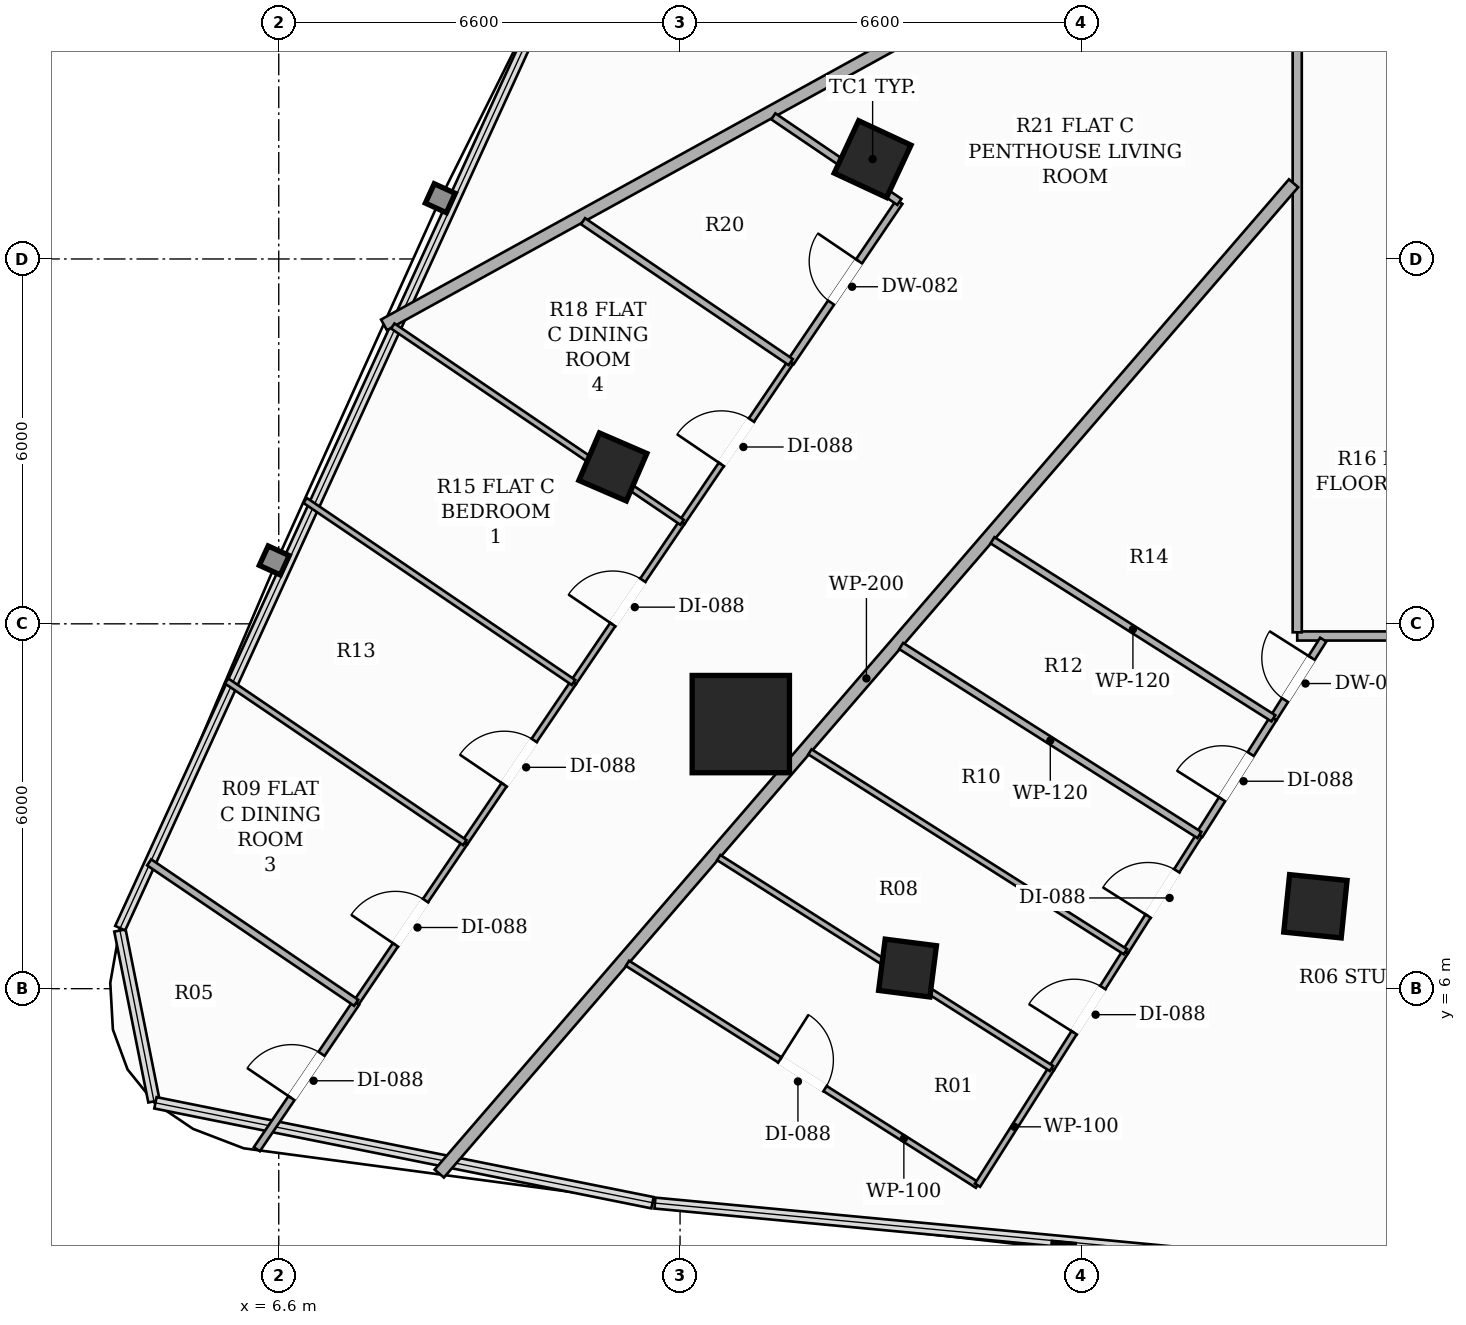
"""IFC4 building model, lengths in metres.
Left out: names, types, materials, properties, quantities, classifications, styles, units other than length and angle.
Written with IfcOpenShell. Run it as: python <this file> out.ifc"""

import sys

from ifc_helpers import new_model, si_unit, direction, frame, frame_2d, origin, origin_2d, place, context, subcontext, project, spatial, rectangle, hollow_rectangle, extrude, element, fill, save


model = new_model("IFC4")
c1 = context("Model", 3, precision=1e-05, world=origin(), true_north=direction((0.0, 1.0)))
c2 = subcontext(c1, "Body", "Model", "MODEL_VIEW")
j1 = project(units=[si_unit("LENGTHUNIT", "METRE"), si_unit("PLANEANGLEUNIT", "RADIAN")], contexts=[c1])
p1 = place(None, origin())
s1 = spatial("IfcSite", under=j1, at=p1, CompositionType="ELEMENT")
p2 = place(p1, origin())
s2 = spatial("IfcBuilding", under=s1, at=p2, CompositionType="ELEMENT")
p3 = place(p2, frame((0.0, 0.0, 30.2)))
s3 = spatial("IfcBuildingStorey", under=s2, at=p3, CompositionType="ELEMENT", Elevation=30.2)
p4 = place(p3, frame((14.199, 10.351, 0.0), z_axis=(0.0, 0.0, 1.0), x_axis=(1.0, 0.0, 0.0)))
e1 = element("IfcColumn", 1, at=p4, inside=s3, PredefinedType="COLUMN", context=c2, shape_type="SweptSolid", body=[
    extrude(hollow_rectangle(XDim=1.6, YDim=1.6, WallThickness=0.05, at=origin_2d()), origin(), (0.0, 0.0, 1.0), 3.3),
])
for number, where, z_axis, x_axis in (
    (2, (16.367, 19.642, 0.0), (0.0, 0.0, 1.0), (0.423, 0.906, 0.0)),
    (3, (23.649, 7.355, 0.0), (0.0, 0.0, 1.0), (-0.995, 0.101, 0.0)),
):
    element("IfcColumn", number, at=place(p3, frame(where, z_axis=z_axis, x_axis=x_axis)), inside=s3, PredefinedType="COLUMN", context=c2, shape_type="SweptSolid", body=[
        extrude(hollow_rectangle(XDim=0.95, YDim=0.95, WallThickness=0.032, at=origin_2d()), origin(), (0.0, 0.0, 1.0), 3.3),
    ])
for number, where, z_axis, x_axis in (
    (4, (12.095, 14.58, 0.0), (0.0, 0.0, 1.0), (0.397, 0.918, 0.0)),
    (5, (16.941, 6.339, 0.0), (0.0, 0.0, 1.0), (-0.992, 0.127, 0.0)),
):
    element("IfcColumn", number, at=place(p3, frame(where, z_axis=z_axis, x_axis=x_axis)), inside=s3, PredefinedType="COLUMN", context=c2, shape_type="SweptSolid", body=[
        extrude(hollow_rectangle(XDim=0.85, YDim=0.85, WallThickness=0.028, at=origin_2d()), origin(), (0.0, 0.0, 1.0), 3.3),
    ])
p5 = place(p3, frame((42.59, 11.8, 0.0), z_axis=(0.0, 0.0, 1.0), x_axis=(-1.0, 0.0, 0.0)))
e6 = element("IfcWall", 6, at=p5, inside=s3, PredefinedType="PARTITIONING", context=c2, shape_type="SweptSolid", body=[
    extrude(rectangle(XDim=19.24, YDim=0.15, at=frame_2d((9.62, 0.0))), origin(), (0.0, 0.0, 1.0), 2.669),
])
p6 = place(p5, frame((12.818, 0.0, 0.0)))
e7 = element("IfcOpeningElement", 7, at=p6, cuts=e6, PredefinedType="OPENING", context=c2, shape_type="SweptSolid", body=[
    extrude(rectangle(XDim=0.92, YDim=2.15, at=frame_2d((0.46, 1.075))), frame((0.0, 0.085, 0.0), z_axis=(0.0, -1.0, 0.0), x_axis=(1.0, 0.0, 0.0)), (0.0, 0.0, 1.0), 0.17),
])
p7 = place(p5, frame((3.519, 0.0, 0.0)))
e8 = element("IfcOpeningElement", 8, at=p7, cuts=e6, PredefinedType="OPENING", context=c2, shape_type="SweptSolid", body=[
    extrude(rectangle(XDim=0.88, YDim=2.1, at=frame_2d((0.44, 1.05))), frame((0.0, 0.085, 0.0), z_axis=(0.0, -1.0, 0.0), x_axis=(1.0, 0.0, 0.0)), (0.0, 0.0, 1.0), 0.17),
])
p8 = place(p3, frame((23.35, 11.86, 0.0), z_axis=(0.0, 0.0, 1.0), x_axis=(0.0, 1.0, 0.0)))
e9 = element("IfcWall", 9, at=p8, inside=s3, PredefinedType="PARTITIONING", context=c2, shape_type="SweptSolid", body=[
    extrude(rectangle(XDim=25.04, YDim=0.15, at=frame_2d((12.52, 0.0))), origin(), (0.0, 0.0, 1.0), 2.413),
])
p9 = place(p8, frame((9.872, 0.0, 0.0)))
e10 = element("IfcOpeningElement", 10, at=p9, cuts=e9, PredefinedType="OPENING", context=c2, shape_type="SweptSolid", body=[
    extrude(rectangle(XDim=0.92, YDim=2.15, at=frame_2d((0.46, 1.075))), frame((0.0, 0.085, 0.0), z_axis=(0.0, -1.0, 0.0), x_axis=(1.0, 0.0, 0.0)), (0.0, 0.0, 1.0), 0.17),
])
p10 = place(p8, frame((18.578, 0.0, 0.0)))
e11 = element("IfcOpeningElement", 11, at=p10, cuts=e9, PredefinedType="OPENING", context=c2, shape_type="SweptSolid", body=[
    extrude(rectangle(XDim=0.88, YDim=2.1, at=frame_2d((0.44, 1.05))), frame((0.0, 0.085, 0.0), z_axis=(0.0, -1.0, 0.0), x_axis=(1.0, 0.0, 0.0)), (0.0, 0.0, 1.0), 0.17),
])
p11 = place(p3, frame((9.24, 2.959, 0.0), z_axis=(0.0, 0.0, 1.0), x_axis=(0.653213734957, 0.757173570896, 0.0)))
e12 = element("IfcWall", 12, at=p11, inside=s3, PredefinedType="PARTITIONING", context=c2, shape_type="SweptSolid", body=[
    extrude(rectangle(XDim=21.509, YDim=0.2, at=frame_2d((10.754, 0.0))), origin(), (0.0, 0.0, 1.0), 2.413),
])
p12 = place(p3, frame((8.331, 16.916, 0.0), z_axis=(0.0, 0.0, 1.0), x_axis=(0.875977946948, 0.482351154721, 0.0)))
e13 = element("IfcWall", 13, at=p12, inside=s3, PredefinedType="PARTITIONING", context=c2, shape_type="SweptSolid", body=[
    extrude(rectangle(XDim=17.077, YDim=0.2, at=frame_2d((8.539, 0.0))), origin(), (0.0, 0.0, 1.0), 2.413),
])
p13 = place(p3, frame((22.958, 10.446, 0.0), z_axis=(0.0, 0.0, 1.0), x_axis=(0.535317457649, 0.844650945383, 0.0)))
e14 = element("IfcWall", 14, at=p13, inside=s3, PredefinedType="PARTITIONING", context=c2, shape_type="SweptSolid", body=[
    extrude(rectangle(XDim=1.532, YDim=0.12, at=frame_2d((0.766, 0.0))), origin(), (0.0, 0.0, 1.0), 3.06),
])
p14 = place(p13, frame((0.356, 0.0, 0.0)))
e15 = element("IfcOpeningElement", 15, at=p14, cuts=e14, PredefinedType="OPENING", context=c2, shape_type="SweptSolid", body=[
    extrude(rectangle(XDim=0.82, YDim=2.1, at=frame_2d((0.41, 1.05))), frame((0.0, 0.07, 0.0), z_axis=(0.0, -1.0, 0.0), x_axis=(1.0, 0.0, 0.0)), (0.0, 0.0, 1.0), 0.14),
])
p15 = place(p3, frame((21.741, 8.527, 0.0), z_axis=(0.0, 0.0, 1.0), x_axis=(0.535588747522, 0.844478947948, 0.0)))
e16 = element("IfcWall", 16, at=p15, inside=s3, PredefinedType="PARTITIONING", context=c2, shape_type="SweptSolid", body=[
    extrude(rectangle(XDim=2.272, YDim=0.12, at=frame_2d((1.136, 0.0))), origin(), (0.0, 0.0, 1.0), 3.06),
])
p16 = place(p15, frame((0.696, 0.0, 0.0)))
e17 = element("IfcOpeningElement", 17, at=p16, cuts=e16, PredefinedType="OPENING", context=c2, shape_type="SweptSolid", body=[
    extrude(rectangle(XDim=0.88, YDim=2.1, at=frame_2d((0.44, 1.05))), frame((0.0, 0.07, 0.0), z_axis=(0.0, -1.0, 0.0), x_axis=(1.0, 0.0, 0.0)), (0.0, 0.0, 1.0), 0.14),
])
p17 = place(p3, frame((12.335, 6.417, 0.0), z_axis=(0.0, 0.0, 1.0), x_axis=(0.844634990869, -0.535342630657, 0.0)))
e18 = element("IfcWall", 18, at=p17, inside=s3, PredefinedType="PARTITIONING", context=c2, shape_type="SweptSolid", body=[
    extrude(rectangle(XDim=6.816, YDim=0.1, at=frame_2d((3.408, 0.0))), origin(), (0.0, 0.0, 1.0), 2.619),
])
p18 = place(p17, frame((2.968, 0.0, 0.0)))
e19 = element("IfcOpeningElement", 19, at=p18, cuts=e18, PredefinedType="OPENING", context=c2, shape_type="SweptSolid", body=[
    extrude(rectangle(XDim=0.88, YDim=2.1, at=frame_2d((0.44, 1.05))), frame((0.0, 0.06, 0.0), z_axis=(0.0, -1.0, 0.0), x_axis=(1.0, 0.0, 0.0)), (0.0, 0.0, 1.0), 0.12),
])
p19 = place(p3, frame((18.092, 2.768, 0.0), z_axis=(0.0, 0.0, 1.0), x_axis=(0.535087860904, 0.844796414003, 0.0)))
e20 = element("IfcWall", 20, at=p19, inside=s3, PredefinedType="PARTITIONING", context=c2, shape_type="SweptSolid", body=[
    extrude(rectangle(XDim=2.273, YDim=0.1, at=frame_2d((1.136, 0.0))), origin(), (0.0, 0.0, 1.0), 3.06),
])
p20 = place(p3, frame((19.308, 4.688, 0.0), z_axis=(0.0, 0.0, 1.0), x_axis=(0.535512120593, 0.844527541705, 0.0)))
e21 = element("IfcWall", 21, at=p20, inside=s3, PredefinedType="PARTITIONING", context=c2, shape_type="SweptSolid", body=[
    extrude(rectangle(XDim=2.272, YDim=0.1, at=frame_2d((1.136, 0.0))), origin(), (0.0, 0.0, 1.0), 2.413),
])
p21 = place(p20, frame((0.696, 0.0, 0.0)))
e22 = element("IfcOpeningElement", 22, at=p21, cuts=e21, PredefinedType="OPENING", context=c2, shape_type="SweptSolid", body=[
    extrude(rectangle(XDim=0.88, YDim=2.1, at=frame_2d((0.44, 1.05))), frame((0.0, 0.06, 0.0), z_axis=(0.0, -1.0, 0.0), x_axis=(1.0, 0.0, 0.0)), (0.0, 0.0, 1.0), 0.12),
])
p22 = place(p3, frame((20.525, 6.607, 0.0), z_axis=(0.0, 0.0, 1.0), x_axis=(0.53503930364, 0.844827167864, 0.0)))
e23 = element("IfcWall", 23, at=p22, inside=s3, PredefinedType="PARTITIONING", context=c2, shape_type="SweptSolid", body=[
    extrude(rectangle(XDim=2.273, YDim=0.1, at=frame_2d((1.136, 0.0))), origin(), (0.0, 0.0, 1.0), 2.413),
])
p23 = place(p22, frame((0.696, 0.0, 0.0)))
e24 = element("IfcOpeningElement", 24, at=p23, cuts=e23, PredefinedType="OPENING", context=c2, shape_type="SweptSolid", body=[
    extrude(rectangle(XDim=0.88, YDim=2.1, at=frame_2d((0.44, 1.05))), frame((0.0, 0.06, 0.0), z_axis=(0.0, -1.0, 0.0), x_axis=(1.0, 0.0, 0.0)), (0.0, 0.0, 1.0), 0.12),
])
p24 = place(p3, frame((22.958, 10.446, 0.0), z_axis=(0.0, 0.0, 1.0), x_axis=(-0.844661668189, 0.535300538289, 0.0)))
e25 = element("IfcWall", 25, at=p24, inside=s3, PredefinedType="PARTITIONING", context=c2, shape_type="SweptSolid", body=[
    extrude(rectangle(XDim=5.47, YDim=0.12, at=frame_2d((2.735, 0.0))), origin(), (0.0, 0.0, 1.0), 2.669),
])
p25 = place(p3, frame((21.741, 8.527, 0.0), z_axis=(0.0, 0.0, 1.0), x_axis=(-0.84466254328, 0.535299157463, 0.0)))
e26 = element("IfcWall", 26, at=p25, inside=s3, PredefinedType="PARTITIONING", context=c2, shape_type="SweptSolid", body=[
    extrude(rectangle(XDim=5.806, YDim=0.12, at=frame_2d((2.903, 0.0))), origin(), (0.0, 0.0, 1.0), 2.669),
])
p26 = place(p3, frame((13.836, 8.156, 0.0), z_axis=(0.0, 0.0, 1.0), x_axis=(0.844657780298, -0.535306673023, 0.0)))
e27 = element("IfcWall", 27, at=p26, inside=s3, PredefinedType="PARTITIONING", context=c2, shape_type="SweptSolid", body=[
    extrude(rectangle(XDim=6.479, YDim=0.1, at=frame_2d((3.239, 0.0))), origin(), (0.0, 0.0, 1.0), 2.413),
])
p27 = place(p3, frame((15.336, 9.895, 0.0), z_axis=(0.0, 0.0, 1.0), x_axis=(0.844690904033, -0.535254403666, 0.0)))
e28 = element("IfcWall", 28, at=p27, inside=s3, PredefinedType="PARTITIONING", context=c2, shape_type="SweptSolid", body=[
    extrude(rectangle(XDim=6.143, YDim=0.1, at=frame_2d((3.072, 0.0))), origin(), (0.0, 0.0, 1.0), 2.413),
])
p28 = place(p3, frame((15.02, 16.304, 0.0), z_axis=(0.0, 0.0, 1.0), x_axis=(0.561248235284, 0.827647520621, 0.0)))
e29 = element("IfcWall", 29, at=p28, inside=s3, PredefinedType="PARTITIONING", context=c2, shape_type="SweptSolid", body=[
    extrude(rectangle(XDim=3.184, YDim=0.12, at=frame_2d((1.592, 0.0))), origin(), (0.0, 0.0, 1.0), 2.669),
])
p29 = place(p28, frame((1.182, 0.0, 0.0)))
e30 = element("IfcOpeningElement", 30, at=p29, cuts=e29, PredefinedType="OPENING", context=c2, shape_type="SweptSolid", body=[
    extrude(rectangle(XDim=0.82, YDim=2.1, at=frame_2d((0.41, 1.05))), frame((0.0, 0.07, 0.0), z_axis=(0.0, -1.0, 0.0), x_axis=(1.0, 0.0, 0.0)), (0.0, 0.0, 1.0), 0.14),
])
p30 = place(p3, frame((16.807, 18.939, 0.0), z_axis=(0.0, 0.0, 1.0), x_axis=(-0.82760029168, 0.561317875372, 0.0)))
e31 = element("IfcWall", 31, at=p30, inside=s3, PredefinedType="PARTITIONING", context=c2, shape_type="SweptSolid", body=[
    extrude(rectangle(XDim=2.505, YDim=0.12, at=frame_2d((1.252, 0.0))), origin(), (0.0, 0.0, 1.0), 2.413),
])
p31 = place(p3, frame((6.24, 3.36, 0.0), z_axis=(0.0, 0.0, 1.0), x_axis=(0.561285940218, 0.82762195072, 0.0)))
e32 = element("IfcWall", 32, at=p31, inside=s3, PredefinedType="PARTITIONING", context=c2, shape_type="SweptSolid", body=[
    extrude(rectangle(XDim=2.909, YDim=0.12, at=frame_2d((1.455, 0.0))), origin(), (0.0, 0.0, 1.0), 3.06),
])
p32 = place(p31, frame((1.015, 0.0, 0.0)))
e33 = element("IfcOpeningElement", 33, at=p32, cuts=e32, PredefinedType="OPENING", context=c2, shape_type="SweptSolid", body=[
    extrude(rectangle(XDim=0.88, YDim=2.1, at=frame_2d((0.44, 1.05))), frame((0.0, 0.07, 0.0), z_axis=(0.0, -1.0, 0.0), x_axis=(1.0, 0.0, 0.0)), (0.0, 0.0, 1.0), 0.14),
])
p33 = place(p3, frame((11.447, 11.036, 0.0), z_axis=(0.0, 0.0, 1.0), x_axis=(0.561180574224, 0.827693399221, 0.0)))
e34 = element("IfcWall", 34, at=p33, inside=s3, PredefinedType="PARTITIONING", context=c2, shape_type="SweptSolid", body=[
    extrude(rectangle(XDim=3.182, YDim=0.1, at=frame_2d((1.591, 0.0))), origin(), (0.0, 0.0, 1.0), 2.413),
])
p34 = place(p33, frame((1.151, 0.0, 0.0)))
e35 = element("IfcOpeningElement", 35, at=p34, cuts=e34, PredefinedType="OPENING", context=c2, shape_type="SweptSolid", body=[
    extrude(rectangle(XDim=0.88, YDim=2.1, at=frame_2d((0.44, 1.05))), frame((0.0, 0.06, 0.0), z_axis=(0.0, -1.0, 0.0), x_axis=(1.0, 0.0, 0.0)), (0.0, 0.0, 1.0), 0.12),
])
p35 = place(p3, frame((9.66, 8.402, 0.0), z_axis=(0.0, 0.0, 1.0), x_axis=(0.561478909132, 0.827491048048, 0.0)))
e36 = element("IfcWall", 36, at=p35, inside=s3, PredefinedType="PARTITIONING", context=c2, shape_type="SweptSolid", body=[
    extrude(rectangle(XDim=3.183, YDim=0.1, at=frame_2d((1.591, 0.0))), origin(), (0.0, 0.0, 1.0), 2.619),
])
p36 = place(p35, frame((1.151, 0.0, 0.0)))
e37 = element("IfcOpeningElement", 37, at=p36, cuts=e36, PredefinedType="OPENING", context=c2, shape_type="SweptSolid", body=[
    extrude(rectangle(XDim=0.88, YDim=2.1, at=frame_2d((0.44, 1.05))), frame((0.0, 0.06, 0.0), z_axis=(0.0, -1.0, 0.0), x_axis=(1.0, 0.0, 0.0)), (0.0, 0.0, 1.0), 0.12),
])
p37 = place(p3, frame((7.873, 5.768, 0.0), z_axis=(0.0, 0.0, 1.0), x_axis=(0.561390746336, 0.827550862442, 0.0)))
e38 = element("IfcWall", 38, at=p37, inside=s3, PredefinedType="PARTITIONING", context=c2, shape_type="SweptSolid", body=[
    extrude(rectangle(XDim=3.183, YDim=0.1, at=frame_2d((1.591, 0.0))), origin(), (0.0, 0.0, 1.0), 2.619),
])
p38 = place(p37, frame((1.151, 0.0, 0.0)))
e39 = element("IfcOpeningElement", 39, at=p38, cuts=e38, PredefinedType="OPENING", context=c2, shape_type="SweptSolid", body=[
    extrude(rectangle(XDim=0.88, YDim=2.1, at=frame_2d((0.44, 1.05))), frame((0.0, 0.06, 0.0), z_axis=(0.0, -1.0, 0.0), x_axis=(1.0, 0.0, 0.0)), (0.0, 0.0, 1.0), 0.12),
])
p39 = place(p3, frame((13.233, 13.67, 0.0), z_axis=(0.0, 0.0, 1.0), x_axis=(0.561443272398, 0.827515227582, 0.0)))
e40 = element("IfcWall", 40, at=p39, inside=s3, PredefinedType="PARTITIONING", context=c2, shape_type="SweptSolid", body=[
    extrude(rectangle(XDim=3.183, YDim=0.1, at=frame_2d((1.592, 0.0))), origin(), (0.0, 0.0, 1.0), 3.06),
])
p40 = place(p39, frame((1.151, 0.0, 0.0)))
e41 = element("IfcOpeningElement", 41, at=p40, cuts=e40, PredefinedType="OPENING", context=c2, shape_type="SweptSolid", body=[
    extrude(rectangle(XDim=0.88, YDim=2.1, at=frame_2d((0.44, 1.05))), frame((0.0, 0.06, 0.0), z_axis=(0.0, -1.0, 0.0), x_axis=(1.0, 0.0, 0.0)), (0.0, 0.0, 1.0), 0.12),
])
p41 = place(p3, frame((15.02, 16.304, 0.0), z_axis=(0.0, 0.0, 1.0), x_axis=(-0.827573908317, 0.561356772715, 0.0)))
e42 = element("IfcWall", 42, at=p41, inside=s3, PredefinedType="PARTITIONING", context=c2, shape_type="SweptSolid", body=[
    extrude(rectangle(XDim=4.128, YDim=0.12, at=frame_2d((2.064, 0.0))), origin(), (0.0, 0.0, 1.0), 2.413),
])
p42 = place(p3, frame((4.469, 8.077, 0.0), z_axis=(0.0, 0.0, 1.0), x_axis=(0.827594933475, -0.561325775362, 0.0)))
e43 = element("IfcWall", 43, at=p42, inside=s3, PredefinedType="PARTITIONING", context=c2, shape_type="SweptSolid", body=[
    extrude(rectangle(XDim=4.113, YDim=0.12, at=frame_2d((2.057, 0.0))), origin(), (0.0, 0.0, 1.0), 3.06),
])
p43 = place(p3, frame((11.447, 11.036, 0.0), z_axis=(0.0, 0.0, 1.0), x_axis=(-0.827600351797, 0.561317786735, 0.0)))
e44 = element("IfcWall", 44, at=p43, inside=s3, PredefinedType="PARTITIONING", context=c2, shape_type="SweptSolid", body=[
    extrude(rectangle(XDim=5.332, YDim=0.1, at=frame_2d((2.666, 0.0))), origin(), (0.0, 0.0, 1.0), 3.06),
])
p44 = place(p3, frame((8.475, 16.898, 0.0), z_axis=(0.0, 0.0, 1.0), x_axis=(0.827515231239, -0.561443267007, 0.0)))
e45 = element("IfcWall", 45, at=p44, inside=s3, PredefinedType="PARTITIONING", context=c2, shape_type="SweptSolid", body=[
    extrude(rectangle(XDim=5.75, YDim=0.1, at=frame_2d((2.875, 0.0))), origin(), (0.0, 0.0, 1.0), 2.413),
])
p45 = place(p3, frame((9.66, 8.402, 0.0), z_axis=(0.0, 0.0, 1.0), x_axis=(-0.827540801305, 0.561405577257, 0.0)))
e46 = element("IfcWall", 46, at=p45, inside=s3, PredefinedType="PARTITIONING", context=c2, shape_type="SweptSolid", body=[
    extrude(rectangle(XDim=4.734, YDim=0.1, at=frame_2d((2.367, 0.0))), origin(), (0.0, 0.0, 1.0), 2.619),
])
p46 = place(p14, origin())
e47 = element("IfcDoor", 47, at=p46, inside=s3, OperationType="SINGLE_SWING_RIGHT", PredefinedType="DOOR", context=c2, shape_type="SweptSolid", body=[
    extrude(rectangle(XDim=0.82, YDim=2.1, at=frame_2d((0.41, 1.05))), frame((0.0, 0.025, 0.0), z_axis=(0.0, -1.0, 0.0), x_axis=(1.0, 0.0, 0.0)), (0.0, 0.0, 1.0), 0.05),
])
fill(e15, e47)
p47 = place(p16, origin())
e48 = element("IfcDoor", 48, at=p47, inside=s3, OperationType="SINGLE_SWING_LEFT", PredefinedType="DOOR", context=c2, shape_type="SweptSolid", body=[
    extrude(rectangle(XDim=0.88, YDim=2.1, at=frame_2d((0.44, 1.05))), frame((0.0, 0.025, 0.0), z_axis=(0.0, -1.0, 0.0), x_axis=(1.0, 0.0, 0.0)), (0.0, 0.0, 1.0), 0.05),
])
fill(e17, e48)
p48 = place(p18, origin())
e49 = element("IfcDoor", 49, at=p48, inside=s3, OperationType="SINGLE_SWING_LEFT", PredefinedType="DOOR", context=c2, shape_type="SweptSolid", body=[
    extrude(rectangle(XDim=0.88, YDim=2.1, at=frame_2d((0.44, 1.05))), frame((0.0, 0.025, 0.0), z_axis=(0.0, -1.0, 0.0), x_axis=(1.0, 0.0, 0.0)), (0.0, 0.0, 1.0), 0.05),
])
fill(e19, e49)
p49 = place(p21, origin())
e50 = element("IfcDoor", 50, at=p49, inside=s3, OperationType="SINGLE_SWING_LEFT", PredefinedType="DOOR", context=c2, shape_type="SweptSolid", body=[
    extrude(rectangle(XDim=0.88, YDim=2.1, at=frame_2d((0.44, 1.05))), frame((0.0, 0.025, 0.0), z_axis=(0.0, -1.0, 0.0), x_axis=(1.0, 0.0, 0.0)), (0.0, 0.0, 1.0), 0.05),
])
fill(e22, e50)
p50 = place(p23, origin())
e51 = element("IfcDoor", 51, at=p50, inside=s3, OperationType="SINGLE_SWING_LEFT", PredefinedType="DOOR", context=c2, shape_type="SweptSolid", body=[
    extrude(rectangle(XDim=0.88, YDim=2.1, at=frame_2d((0.44, 1.05))), frame((0.0, 0.025, 0.0), z_axis=(0.0, -1.0, 0.0), x_axis=(1.0, 0.0, 0.0)), (0.0, 0.0, 1.0), 0.05),
])
fill(e24, e51)
p51 = place(p29, origin())
e52 = element("IfcDoor", 52, at=p51, inside=s3, OperationType="SINGLE_SWING_RIGHT", PredefinedType="DOOR", context=c2, shape_type="SweptSolid", body=[
    extrude(rectangle(XDim=0.82, YDim=2.1, at=frame_2d((0.41, 1.05))), frame((0.0, 0.025, 0.0), z_axis=(0.0, -1.0, 0.0), x_axis=(1.0, 0.0, 0.0)), (0.0, 0.0, 1.0), 0.05),
])
fill(e30, e52)
p52 = place(p32, origin())
e53 = element("IfcDoor", 53, at=p52, inside=s3, OperationType="SINGLE_SWING_LEFT", PredefinedType="DOOR", context=c2, shape_type="SweptSolid", body=[
    extrude(rectangle(XDim=0.88, YDim=2.1, at=frame_2d((0.44, 1.05))), frame((0.0, 0.025, 0.0), z_axis=(0.0, -1.0, 0.0), x_axis=(1.0, 0.0, 0.0)), (0.0, 0.0, 1.0), 0.05),
])
fill(e33, e53)
p53 = place(p34, origin())
e54 = element("IfcDoor", 54, at=p53, inside=s3, OperationType="SINGLE_SWING_LEFT", PredefinedType="DOOR", context=c2, shape_type="SweptSolid", body=[
    extrude(rectangle(XDim=0.88, YDim=2.1, at=frame_2d((0.44, 1.05))), frame((0.0, 0.025, 0.0), z_axis=(0.0, -1.0, 0.0), x_axis=(1.0, 0.0, 0.0)), (0.0, 0.0, 1.0), 0.05),
])
fill(e35, e54)
p54 = place(p36, origin())
e55 = element("IfcDoor", 55, at=p54, inside=s3, OperationType="SINGLE_SWING_LEFT", PredefinedType="DOOR", context=c2, shape_type="SweptSolid", body=[
    extrude(rectangle(XDim=0.88, YDim=2.1, at=frame_2d((0.44, 1.05))), frame((0.0, 0.025, 0.0), z_axis=(0.0, -1.0, 0.0), x_axis=(1.0, 0.0, 0.0)), (0.0, 0.0, 1.0), 0.05),
])
fill(e37, e55)
p55 = place(p38, origin())
e56 = element("IfcDoor", 56, at=p55, inside=s3, OperationType="SINGLE_SWING_LEFT", PredefinedType="DOOR", context=c2, shape_type="SweptSolid", body=[
    extrude(rectangle(XDim=0.88, YDim=2.1, at=frame_2d((0.44, 1.05))), frame((0.0, 0.025, 0.0), z_axis=(0.0, -1.0, 0.0), x_axis=(1.0, 0.0, 0.0)), (0.0, 0.0, 1.0), 0.05),
])
fill(e39, e56)
p56 = place(p40, origin())
e57 = element("IfcDoor", 57, at=p56, inside=s3, OperationType="SINGLE_SWING_LEFT", PredefinedType="DOOR", context=c2, shape_type="SweptSolid", body=[
    extrude(rectangle(XDim=0.88, YDim=2.1, at=frame_2d((0.44, 1.05))), frame((0.0, 0.025, 0.0), z_axis=(0.0, -1.0, 0.0), x_axis=(1.0, 0.0, 0.0)), (0.0, 0.0, 1.0), 0.05),
])
fill(e41, e57)
save(model, sys.argv[1])
